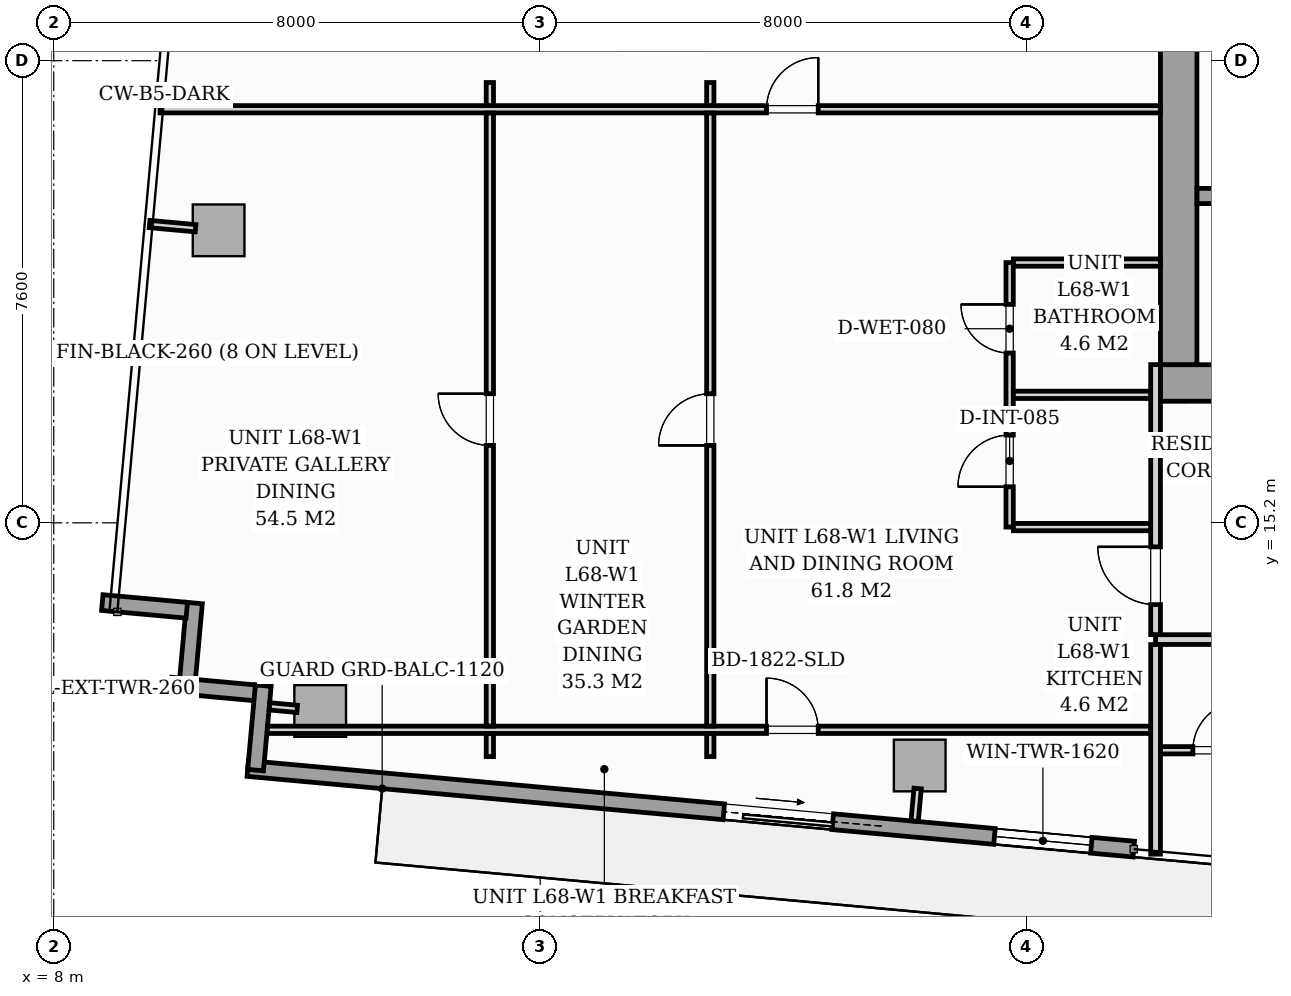
"""IFC4 building model, lengths in metres.
Left out: names, types, materials, properties, quantities, classifications, styles, units other than length and angle.
Written with IfcOpenShell. Run it as: python <this file> out.ifc"""

import sys

from ifc_helpers import new_model, si_unit, direction, frame, frame_2d, origin, origin_2d, place, context, subcontext, project, spatial, rectangle, i_section, extrude, source, transform, mapped, element, fill, save


model = new_model("IFC4")
c1 = context("Model", 3, precision=1e-05, world=origin(), true_north=direction((0.0, 1.0)))
c2 = subcontext(c1, "Body", "Model", "MODEL_VIEW")
j1 = project(units=[si_unit("LENGTHUNIT", "METRE"), si_unit("PLANEANGLEUNIT", "RADIAN")], contexts=[c1])
p1 = place(None, origin())
s1 = spatial("IfcSite", under=j1, at=p1, CompositionType="ELEMENT")
p2 = place(p1, origin())
s2 = spatial("IfcBuilding", under=s1, at=p2, CompositionType="ELEMENT")
p3 = place(p2, frame((0.0, 0.0, 236.4)))
s3 = spatial("IfcBuildingStorey", under=s2, at=p3, CompositionType="ELEMENT", Elevation=236.4)
m1 = source(origin(), c2, "Body", "SweptSolid", [
    extrude(i_section(OverallWidth=0.409, OverallDepth=0.425, WebThickness=0.033, FlangeThickness=0.052, FilletRadius=0.018, at=origin_2d()), origin(), (0.0, 0.0, 1.0), 3.296),
])
p4 = place(p3, frame((26.4, 17.4, 0.002), z_axis=(0.0, 0.0, 1.0), x_axis=(1.0, 0.0, 0.0)))
e1 = element("IfcColumn", 1, at=p4, inside=s3, PredefinedType="PILASTER", context=c2, shape_type="MappedRepresentation", body=[
    mapped(m1, transform((0.0, 0.0, 0.0), scale=1.0)),
])
m2 = source(origin(), c2, "Body", "SweptSolid", [
    extrude(rectangle(XDim=0.85, YDim=0.85, at=origin_2d()), origin(), (0.0, 0.0, 1.0), 3.296),
])
for number, where, z_axis, x_axis in (
    (2, (12.382, 12.106, 0.002), (0.0, 0.0, 1.0), (0.996, -0.091, 0.0)),
    (3, (22.241, 11.209, 0.002), (0.0, 0.0, 1.0), (0.996, -0.091, 0.0)),
    (4, (10.711, 20.01, 0.002), (0.0, 0.0, 1.0), (0.996, -0.091, 0.0)),
):
    element("IfcColumn", number, at=place(p3, frame(where, z_axis=z_axis, x_axis=x_axis)), inside=s3, PredefinedType="COLUMN", context=c2, shape_type="MappedRepresentation", body=[
        mapped(m2, transform((0.0, 0.0, 0.0), scale=1.0)),
    ])
p5 = place(p3, frame((11.319, 12.404, 0.0), z_axis=(0.0, 0.0, 1.0), x_axis=(-0.995881721538, 0.090661991521, 0.0)))
e5 = element("IfcWall", 5, at=p5, inside=s3, PredefinedType="STANDARD", context=c2, shape_type="SweptSolid", body=[
    extrude(rectangle(XDim=1.395, YDim=0.26, at=frame_2d((0.698, 0.0))), origin(), (0.0, 0.0, 1.0), 3.04),
])
p6 = place(p3, frame((10.188, 12.492, 0.0), z_axis=(0.0, 0.0, 1.0), x_axis=(0.090646191665, 0.995883159782, 0.0)))
e6 = element("IfcWall", 6, at=p6, inside=s3, PredefinedType="STANDARD", context=c2, shape_type="SweptSolid", body=[
    extrude(rectangle(XDim=1.395, YDim=0.26, at=frame_2d((0.698, 0.0))), origin(), (0.0, 0.0, 1.0), 3.04),
])
p7 = place(p3, frame((10.188, 13.762, 0.0), z_axis=(0.0, 0.0, 1.0), x_axis=(-0.995881721538, 0.090661991521, 0.0)))
e7 = element("IfcWall", 7, at=p7, inside=s3, PredefinedType="STANDARD", context=c2, shape_type="SweptSolid", body=[
    extrude(rectangle(XDim=1.395, YDim=0.26, at=frame_2d((0.698, 0.0))), origin(), (0.0, 0.0, 1.0), 3.04),
])
p8 = place(p3, frame((25.761, 9.834, 0.0), z_axis=(0.0, 0.0, 1.0), x_axis=(-0.995884584572, 0.090630536861, 0.0)))
e8 = element("IfcWall", 8, at=p8, inside=s3, PredefinedType="STANDARD", context=c2, shape_type="SweptSolid", body=[
    extrude(rectangle(XDim=14.63, YDim=0.26, at=frame_2d((7.315, 0.0))), origin(), (0.0, 0.0, 1.0), 3.04),
])
p9 = place(p8, frame((4.97, 0.0, 0.0)))
e9 = element("IfcOpeningElement", 9, at=p9, cuts=e8, PredefinedType="OPENING", context=c2, shape_type="SweptSolid", body=[
    extrude(rectangle(XDim=1.8, YDim=2.06, at=frame_2d((0.9, 1.03))), frame((0.0, 0.14, 0.0), z_axis=(0.0, -1.0, 0.0), x_axis=(1.0, 0.0, 0.0)), (0.0, 0.0, 1.0), 0.28),
])
p10 = place(p8, frame((0.7, 0.0, 0.65)))
e10 = element("IfcOpeningElement", 10, at=p10, cuts=e8, PredefinedType="OPENING", context=c2, shape_type="SweptSolid", body=[
    extrude(rectangle(XDim=1.6, YDim=1.5, at=frame_2d((0.8, 0.75))), frame((0.0, 0.14, 0.0), z_axis=(0.0, -1.0, 0.0), x_axis=(1.0, 0.0, 0.0)), (0.0, 0.0, 1.0), 0.28),
])
p11 = place(p3, frame((11.319, 11.134, 0.0), z_axis=(0.0, 0.0, 1.0), x_axis=(0.090661991521, 0.995881721538, 0.0)))
e11 = element("IfcWall", 11, at=p11, inside=s3, PredefinedType="STANDARD", context=c2, shape_type="SweptSolid", body=[
    extrude(rectangle(XDim=1.395, YDim=0.26, at=frame_2d((0.698, 0.0))), origin(), (0.0, 0.0, 1.0), 3.04),
])
p12 = place(p3, frame((26.2, 17.5, 0.0), z_axis=(0.0, 0.0, 1.0), x_axis=(1.0, 0.0, 0.0)))
e12 = element("IfcWall", 12, at=p12, inside=s3, PredefinedType="SHEAR", context=c2, shape_type="SweptSolid", body=[
    extrude(rectangle(XDim=19.6, YDim=0.6, at=frame_2d((9.8, 0.0))), origin(), (0.0, 0.0, 1.0), 3.3),
])
p13 = place(p12, frame((0.95, 0.0, 0.0)))
e13 = element("IfcOpeningElement", 13, at=p13, cuts=e12, PredefinedType="OPENING", context=c2, shape_type="SweptSolid", body=[
    extrude(rectangle(XDim=0.95, YDim=2.06, at=frame_2d((0.475, 1.03))), frame((0.0, 0.31, 0.0), z_axis=(0.0, -1.0, 0.0), x_axis=(1.0, 0.0, 0.0)), (0.0, 0.0, 1.0), 0.62),
])
p14 = place(p12, frame((9.38, 0.0, 0.0)))
e14 = element("IfcOpeningElement", 14, at=p14, cuts=e12, PredefinedType="OPENING", context=c2, shape_type="SweptSolid", body=[
    extrude(rectangle(XDim=0.85, YDim=2.0, at=frame_2d((0.425, 1.0))), frame((0.0, 0.31, 0.0), z_axis=(0.0, -1.0, 0.0), x_axis=(1.0, 0.0, 0.0)), (0.0, 0.0, 1.0), 0.62),
])
p15 = place(p12, frame((17.55, 0.0, 0.0)))
e15 = element("IfcOpeningElement", 15, at=p15, cuts=e12, PredefinedType="OPENING", context=c2, shape_type="SweptSolid", body=[
    extrude(rectangle(XDim=0.95, YDim=2.06, at=frame_2d((0.475, 1.03))), frame((0.0, 0.31, 0.0), z_axis=(0.0, -1.0, 0.0), x_axis=(1.0, 0.0, 0.0)), (0.0, 0.0, 1.0), 0.62),
])
p16 = place(p3, frame((26.5, 17.802, 0.0), z_axis=(0.0, 0.0, 1.0), x_axis=(0.0, 1.0, 0.0)))
e16 = element("IfcWall", 16, at=p16, inside=s3, PredefinedType="SHEAR", context=c2, shape_type="SweptSolid", body=[
    extrude(rectangle(XDim=5.796, YDim=0.6, at=frame_2d((2.898, 0.0))), origin(), (0.0, 0.0, 1.0), 3.3),
])
p17 = place(p3, frame((26.802, 20.575, 0.0), z_axis=(0.0, 0.0, 1.0), x_axis=(1.0, 0.0, 0.0)))
e17 = element("IfcWall", 17, at=p17, inside=s3, PredefinedType="SOLIDWALL", context=c2, shape_type="SweptSolid", body=[
    extrude(rectangle(XDim=8.148, YDim=0.25, at=frame_2d((4.074, 0.0))), origin(), (0.0, 0.0, 1.0), 3.3),
])
p18 = place(p17, frame((0.298, 0.0, 0.0)))
e18 = element("IfcOpeningElement", 18, at=p18, cuts=e17, PredefinedType="OPENING", context=c2, shape_type="SweptSolid", body=[
    extrude(rectangle(XDim=0.95, YDim=2.06, at=frame_2d((0.475, 1.03))), frame((0.0, 0.135, 0.0), z_axis=(0.0, -1.0, 0.0), x_axis=(1.0, 0.0, 0.0)), (0.0, 0.0, 1.0), 0.27),
])
p19 = place(p3, frame((26.12, 13.28, 0.0), z_axis=(0.0, 0.0, 1.0), x_axis=(1.0, 0.0, 0.0)))
e19 = element("IfcWall", 19, at=p19, inside=s3, PredefinedType="PARTITIONING", context=c2, shape_type="SweptSolid", body=[
    extrude(rectangle(XDim=21.33, YDim=0.16, at=frame_2d((10.665, 0.0))), origin(), (0.0, 0.0, 1.0), 2.597),
])
p20 = place(p19, frame((4.704, 0.0, 0.0)))
e20 = element("IfcOpeningElement", 20, at=p20, cuts=e19, PredefinedType="OPENING", context=c2, shape_type="SweptSolid", body=[
    extrude(rectangle(XDim=0.95, YDim=2.06, at=frame_2d((0.475, 1.03))), frame((0.0, 0.09, 0.0), z_axis=(0.0, -1.0, 0.0), x_axis=(1.0, 0.0, 0.0)), (0.0, 0.0, 1.0), 0.18),
])
p21 = place(p19, frame((7.5, 0.0, 0.0)))
e21 = element("IfcOpeningElement", 21, at=p21, cuts=e19, PredefinedType="OPENING", context=c2, shape_type="SweptSolid", body=[
    extrude(rectangle(XDim=0.95, YDim=2.06, at=frame_2d((0.475, 1.03))), frame((0.0, 0.09, 0.0), z_axis=(0.0, -1.0, 0.0), x_axis=(1.0, 0.0, 0.0)), (0.0, 0.0, 1.0), 0.18),
])
p22 = place(p19, frame((14.976, 0.0, 0.0)))
e22 = element("IfcOpeningElement", 22, at=p22, cuts=e19, PredefinedType="OPENING", context=c2, shape_type="SweptSolid", body=[
    extrude(rectangle(XDim=0.95, YDim=2.06, at=frame_2d((0.475, 1.03))), frame((0.0, 0.09, 0.0), z_axis=(0.0, -1.0, 0.0), x_axis=(1.0, 0.0, 0.0)), (0.0, 0.0, 1.0), 0.18),
])
p23 = place(p3, frame((26.12, 9.751, 0.0), z_axis=(0.0, 0.0, 1.0), x_axis=(0.0, 1.0, 0.0)))
e23 = element("IfcWall", 23, at=p23, inside=s3, PredefinedType="PARTITIONING", context=c2, shape_type="SweptSolid", body=[
    extrude(rectangle(XDim=3.447, YDim=0.16, at=frame_2d((1.723, 0.0))), origin(), (0.0, 0.0, 1.0), 3.04),
])
p24 = place(p3, frame((26.12, 13.362, 0.0), z_axis=(0.0, 0.0, 1.0), x_axis=(0.0, 1.0, 0.0)))
e24 = element("IfcWall", 24, at=p24, inside=s3, PredefinedType="PARTITIONING", context=c2, shape_type="SweptSolid", body=[
    extrude(rectangle(XDim=4.44, YDim=0.16, at=frame_2d((2.22, 0.0))), origin(), (0.0, 0.0, 1.0), 3.04),
])
p25 = place(p24, frame((0.493, 0.0, 0.0)))
e25 = element("IfcOpeningElement", 25, at=p25, cuts=e24, PredefinedType="OPENING", context=c2, shape_type="SweptSolid", body=[
    extrude(rectangle(XDim=0.95, YDim=2.06, at=frame_2d((0.475, 1.03))), frame((0.0, 0.09, 0.0), z_axis=(0.0, -1.0, 0.0), x_axis=(1.0, 0.0, 0.0)), (0.0, 0.0, 1.0), 0.18),
])
p26 = place(p3, frame((26.202, 11.46, 0.0), z_axis=(0.0, 0.0, 1.0), x_axis=(1.0, 0.0, 0.0)))
e26 = element("IfcWall", 26, at=p26, inside=s3, PredefinedType="PARTITIONING", context=c2, shape_type="SweptSolid", body=[
    extrude(rectangle(XDim=3.978, YDim=0.12, at=frame_2d((1.989, 0.0))), origin(), (0.0, 0.0, 1.0), 2.597),
])
p27 = place(p26, frame((0.531, 0.0, 0.0)))
e27 = element("IfcOpeningElement", 27, at=p27, cuts=e26, PredefinedType="OPENING", context=c2, shape_type="SweptSolid", body=[
    extrude(rectangle(XDim=0.8, YDim=2.02, at=frame_2d((0.4, 1.01))), frame((0.0, 0.07, 0.0), z_axis=(0.0, -1.0, 0.0), x_axis=(1.0, 0.0, 0.0)), (0.0, 0.0, 1.0), 0.14),
])
p28 = place(p26, frame((2.496, 0.0, 0.0)))
e28 = element("IfcOpeningElement", 28, at=p28, cuts=e26, PredefinedType="OPENING", context=c2, shape_type="SweptSolid", body=[
    extrude(rectangle(XDim=0.85, YDim=2.05, at=frame_2d((0.425, 1.025))), frame((0.0, 0.07, 0.0), z_axis=(0.0, -1.0, 0.0), x_axis=(1.0, 0.0, 0.0)), (0.0, 0.0, 1.0), 0.14),
])
p29 = place(p3, frame((23.72, 15.13, 0.0), z_axis=(0.0, 0.0, 1.0), x_axis=(0.0, 1.0, 0.0)))
e29 = element("IfcWall", 29, at=p29, inside=s3, PredefinedType="PARTITIONING", context=c2, shape_type="SweptSolid", body=[
    extrude(rectangle(XDim=4.35, YDim=0.12, at=frame_2d((2.175, 0.0))), origin(), (0.0, 0.0, 1.0), 3.04),
])
p30 = place(p29, frame((0.663, 0.0, 0.0)))
e30 = element("IfcOpeningElement", 30, at=p30, cuts=e29, PredefinedType="OPENING", context=c2, shape_type="SweptSolid", body=[
    extrude(rectangle(XDim=0.85, YDim=2.05, at=frame_2d((0.425, 1.025))), frame((0.0, 0.07, 0.0), z_axis=(0.0, -1.0, 0.0), x_axis=(1.0, 0.0, 0.0)), (0.0, 0.0, 1.0), 0.14),
])
p31 = place(p29, frame((2.862, 0.0, 0.0)))
e31 = element("IfcOpeningElement", 31, at=p31, cuts=e29, PredefinedType="OPENING", context=c2, shape_type="SweptSolid", body=[
    extrude(rectangle(XDim=0.8, YDim=2.02, at=frame_2d((0.4, 1.01))), frame((0.0, 0.07, 0.0), z_axis=(0.0, -1.0, 0.0), x_axis=(1.0, 0.0, 0.0)), (0.0, 0.0, 1.0), 0.14),
])
p32 = place(p3, frame((23.782, 17.305, 0.0), z_axis=(0.0, 0.0, 1.0), x_axis=(1.0, 0.0, 0.0)))
e32 = element("IfcWall", 32, at=p32, inside=s3, PredefinedType="PARTITIONING", context=c2, shape_type="SweptSolid", body=[
    extrude(rectangle(XDim=2.256, YDim=0.12, at=frame_2d((1.128, 0.0))), origin(), (0.0, 0.0, 1.0), 2.382),
])
p33 = place(p3, frame((23.782, 15.13, 0.0), z_axis=(0.0, 0.0, 1.0), x_axis=(1.0, 0.0, 0.0)))
e33 = element("IfcWall", 33, at=p33, inside=s3, PredefinedType="PARTITIONING", context=c2, shape_type="SweptSolid", body=[
    extrude(rectangle(XDim=2.256, YDim=0.12, at=frame_2d((1.128, 0.0))), origin(), (0.0, 0.0, 1.0), 3.04),
])
p34 = place(p3, frame((23.782, 19.48, 0.0), z_axis=(0.0, 0.0, 1.0), x_axis=(1.0, 0.0, 0.0)))
e34 = element("IfcWall", 34, at=p34, inside=s3, PredefinedType="PARTITIONING", context=c2, shape_type="SweptSolid", body=[
    extrude(rectangle(XDim=2.416, YDim=0.12, at=frame_2d((1.208, 0.0))), origin(), (0.0, 0.0, 1.0), 3.04),
])
p35 = place(p3, frame((9.748, 22.001, 0.0), z_axis=(0.0, 0.0, 1.0), x_axis=(1.0, 0.0, 0.0)))
e35 = element("IfcWall", 35, at=p35, inside=s3, PredefinedType="PARTITIONING", context=c2, shape_type="SweptSolid", body=[
    extrude(rectangle(XDim=16.45, YDim=0.12, at=frame_2d((8.225, 0.0))), origin(), (0.0, 0.0, 1.0), 3.04),
])
p36 = place(p35, frame((9.974, 0.0, 0.0)))
e36 = element("IfcOpeningElement", 36, at=p36, cuts=e35, PredefinedType="OPENING", context=c2, shape_type="SweptSolid", body=[
    extrude(rectangle(XDim=0.85, YDim=2.05, at=frame_2d((0.425, 1.025))), frame((0.0, 0.07, 0.0), z_axis=(0.0, -1.0, 0.0), x_axis=(1.0, 0.0, 0.0)), (0.0, 0.0, 1.0), 0.14),
])
p37 = place(p3, frame((11.512, 11.796, 0.0), z_axis=(0.0, 0.0, 1.0), x_axis=(1.0, 0.0, 0.0)))
e37 = element("IfcWall", 37, at=p37, inside=s3, PredefinedType="PARTITIONING", context=c2, shape_type="SweptSolid", body=[
    extrude(rectangle(XDim=14.526, YDim=0.12, at=frame_2d((7.263, 0.0))), origin(), (0.0, 0.0, 1.0), 2.483),
])
p38 = place(p37, frame((8.21, 0.0, 0.0)))
e38 = element("IfcOpeningElement", 38, at=p38, cuts=e37, PredefinedType="OPENING", context=c2, shape_type="SweptSolid", body=[
    extrude(rectangle(XDim=0.85, YDim=2.05, at=frame_2d((0.425, 1.025))), frame((0.0, 0.07, 0.0), z_axis=(0.0, -1.0, 0.0), x_axis=(1.0, 0.0, 0.0)), (0.0, 0.0, 1.0), 0.14),
])
p39 = place(p3, frame((15.172, 11.356, 0.0), z_axis=(0.0, 0.0, 1.0), x_axis=(0.0, 1.0, 0.0)))
e39 = element("IfcWall", 39, at=p39, inside=s3, PredefinedType="PARTITIONING", context=c2, shape_type="SweptSolid", body=[
    extrude(rectangle(XDim=0.378, YDim=0.12, at=frame_2d((0.189, 0.0))), origin(), (0.0, 0.0, 1.0), 3.04),
])
p40 = place(p3, frame((15.172, 11.858, 0.0), z_axis=(0.0, 0.0, 1.0), x_axis=(0.0, 1.0, 0.0)))
e40 = element("IfcWall", 40, at=p40, inside=s3, PredefinedType="PARTITIONING", context=c2, shape_type="SweptSolid", body=[
    extrude(rectangle(XDim=10.081, YDim=0.12, at=frame_2d((5.041, 0.0))), origin(), (0.0, 0.0, 1.0), 3.04),
])
p41 = place(p40, frame((4.615, 0.0, 0.0)))
e41 = element("IfcOpeningElement", 41, at=p41, cuts=e40, PredefinedType="OPENING", context=c2, shape_type="SweptSolid", body=[
    extrude(rectangle(XDim=0.85, YDim=2.05, at=frame_2d((0.425, 1.025))), frame((0.0, 0.07, 0.0), z_axis=(0.0, -1.0, 0.0), x_axis=(1.0, 0.0, 0.0)), (0.0, 0.0, 1.0), 0.14),
])
for number, where, z_axis, x_axis in (
    (42, (15.172, 22.063, 0.0), (0.0, 0.0, 1.0), (0.0, 1.0, 0.0)),
    (43, (18.797, 11.356, 0.0), (0.0, 0.0, 1.0), (0.0, 1.0, 0.0)),
):
    element("IfcWall", number, at=place(p3, frame(where, z_axis=z_axis, x_axis=x_axis)), inside=s3, PredefinedType="PARTITIONING", context=c2, shape_type="SweptSolid", body=[
        extrude(rectangle(XDim=0.378, YDim=0.12, at=frame_2d((0.189, 0.0))), origin(), (0.0, 0.0, 1.0), 3.04),
    ])
p42 = place(p3, frame((18.797, 11.858, 0.0), z_axis=(0.0, 0.0, 1.0), x_axis=(0.0, 1.0, 0.0)))
e44 = element("IfcWall", 44, at=p42, inside=s3, PredefinedType="PARTITIONING", context=c2, shape_type="SweptSolid", body=[
    extrude(rectangle(XDim=10.081, YDim=0.12, at=frame_2d((5.041, 0.0))), origin(), (0.0, 0.0, 1.0), 3.04),
])
p43 = place(p42, frame((4.615, 0.0, 0.0)))
e45 = element("IfcOpeningElement", 45, at=p43, cuts=e44, PredefinedType="OPENING", context=c2, shape_type="SweptSolid", body=[
    extrude(rectangle(XDim=0.85, YDim=2.05, at=frame_2d((0.425, 1.025))), frame((0.0, 0.07, 0.0), z_axis=(0.0, -1.0, 0.0), x_axis=(1.0, 0.0, 0.0)), (0.0, 0.0, 1.0), 0.14),
])
p44 = place(p3, frame((18.797, 22.063, 0.0), z_axis=(0.0, 0.0, 1.0), x_axis=(0.0, 1.0, 0.0)))
e46 = element("IfcWall", 46, at=p44, inside=s3, PredefinedType="PARTITIONING", context=c2, shape_type="SweptSolid", body=[
    extrude(rectangle(XDim=0.378, YDim=0.12, at=frame_2d((0.189, 0.0))), origin(), (0.0, 0.0, 1.0), 3.04),
])
p45 = place(p3, frame((12.003, 12.141, 0.0), z_axis=(0.0, 0.0, 1.0), x_axis=(-0.995884462012, 0.090631883588, 0.0)))
e47 = element("IfcWall", 47, at=p45, inside=s3, PredefinedType="PARTITIONING", context=c2, shape_type="SweptSolid", body=[
    extrude(rectangle(XDim=0.458, YDim=0.12, at=frame_2d((0.229, 0.0))), origin(), (0.0, 0.0, 1.0), 3.04),
])
p46 = place(p3, frame((22.207, 10.831, 0.0), z_axis=(0.0, 0.0, 1.0), x_axis=(-0.090781299264, -0.995870852924, 0.0)))
e48 = element("IfcWall", 48, at=p46, inside=s3, PredefinedType="PARTITIONING", context=c2, shape_type="SweptSolid", body=[
    extrude(rectangle(XDim=0.538, YDim=0.12, at=frame_2d((0.269, 0.0))), origin(), (0.0, 0.0, 1.0), 3.04),
])
p47 = place(p3, frame((10.333, 20.045, 0.0), z_axis=(0.0, 0.0, 1.0), x_axis=(-0.995890573658, 0.09056470228, 0.0)))
e49 = element("IfcWall", 49, at=p47, inside=s3, PredefinedType="PARTITIONING", context=c2, shape_type="SweptSolid", body=[
    extrude(rectangle(XDim=0.76, YDim=0.12, at=frame_2d((0.38, 0.0))), origin(), (0.0, 0.0, 1.0), 3.04),
])
m3 = source(origin(), c2, "Body", "SweptSolid", [
    extrude(rectangle(XDim=1.8, YDim=2.06, at=frame_2d((0.9, 1.03))), frame((0.0, 0.025, 0.0), z_axis=(0.0, -1.0, 0.0), x_axis=(1.0, 0.0, 0.0)), (0.0, 0.0, 1.0), 0.05),
])
p48 = place(p9, origin())
e50 = element("IfcDoor", 50, at=p48, inside=s3, OperationType="SLIDING_TO_LEFT", PredefinedType="DOOR", context=c2, shape_type="MappedRepresentation", body=[
    mapped(m3, transform((0.0, 0.0, 0.0), scale=1.0)),
])
fill(e9, e50)
m4 = source(origin(), c2, "Body", "SweptSolid", [
    extrude(rectangle(XDim=1.6, YDim=1.5, at=frame_2d((0.8, 0.75))), frame((0.0, 0.03, 0.0), z_axis=(0.0, -1.0, 0.0), x_axis=(1.0, 0.0, 0.0)), (0.0, 0.0, 1.0), 0.06),
])
p49 = place(p10, origin())
e51 = element("IfcWindow", 51, at=p49, inside=s3, PartitioningType="SINGLE_PANEL", PredefinedType="WINDOW", context=c2, shape_type="MappedRepresentation", body=[
    mapped(m4, transform((0.0, 0.0, 0.0), scale=1.0)),
])
fill(e10, e51)
m5 = source(origin(), c2, "Body", "SweptSolid", [
    extrude(rectangle(XDim=0.8, YDim=2.02, at=frame_2d((0.4, 1.01))), frame((0.0, 0.025, 0.0), z_axis=(0.0, -1.0, 0.0), x_axis=(1.0, 0.0, 0.0)), (0.0, 0.0, 1.0), 0.05),
])
p50 = place(p27, origin())
e52 = element("IfcDoor", 52, at=p50, inside=s3, OperationType="SINGLE_SWING_RIGHT", PredefinedType="DOOR", context=c2, shape_type="MappedRepresentation", body=[
    mapped(m5, transform((0.0, 0.0, 0.0), scale=1.0)),
])
fill(e27, e52)
m6 = source(origin(), c2, "Body", "SweptSolid", [
    extrude(rectangle(XDim=0.95, YDim=2.06, at=frame_2d((0.475, 1.03))), frame((0.0, 0.025, 0.0), z_axis=(0.0, -1.0, 0.0), x_axis=(1.0, 0.0, 0.0)), (0.0, 0.0, 1.0), 0.05),
])
p51 = place(p25, origin())
e53 = element("IfcDoor", 53, at=p51, inside=s3, OperationType="SINGLE_SWING_RIGHT", PredefinedType="DOOR", context=c2, shape_type="MappedRepresentation", body=[
    mapped(m6, transform((0.0, 0.0, 0.0), scale=1.0)),
])
fill(e25, e53)
m7 = source(origin(), c2, "Body", "SweptSolid", [
    extrude(rectangle(XDim=0.85, YDim=2.05, at=frame_2d((0.425, 1.025))), frame((0.0, 0.025, 0.0), z_axis=(0.0, -1.0, 0.0), x_axis=(1.0, 0.0, 0.0)), (0.0, 0.0, 1.0), 0.05),
])
p52 = place(p30, origin())
e54 = element("IfcDoor", 54, at=p52, inside=s3, OperationType="SINGLE_SWING_LEFT", PredefinedType="DOOR", context=c2, shape_type="MappedRepresentation", body=[
    mapped(m7, transform((0.0, 0.0, 0.0), scale=1.0)),
])
fill(e30, e54)
p53 = place(p31, origin())
e55 = element("IfcDoor", 55, at=p53, inside=s3, OperationType="SINGLE_SWING_RIGHT", PredefinedType="DOOR", context=c2, shape_type="MappedRepresentation", body=[
    mapped(m5, transform((0.0, 0.0, 0.0), scale=1.0)),
])
fill(e31, e55)
p54 = place(p36, origin())
e56 = element("IfcDoor", 56, at=p54, inside=s3, OperationType="SINGLE_SWING_RIGHT", PredefinedType="DOOR", context=c2, shape_type="MappedRepresentation", body=[
    mapped(m7, transform((0.0, 0.0, 0.0), scale=1.0)),
])
fill(e36, e56)
p55 = place(p38, origin())
e57 = element("IfcDoor", 57, at=p55, inside=s3, OperationType="SINGLE_SWING_LEFT", PredefinedType="DOOR", context=c2, shape_type="MappedRepresentation", body=[
    mapped(m7, transform((0.0, 0.0, 0.0), scale=1.0)),
])
fill(e38, e57)
p56 = place(p41, origin())
e58 = element("IfcDoor", 58, at=p56, inside=s3, OperationType="SINGLE_SWING_RIGHT", PredefinedType="DOOR", context=c2, shape_type="MappedRepresentation", body=[
    mapped(m7, transform((0.0, 0.0, 0.0), scale=1.0)),
])
fill(e41, e58)
p57 = place(p43, origin())
e59 = element("IfcDoor", 59, at=p57, inside=s3, OperationType="SINGLE_SWING_LEFT", PredefinedType="DOOR", context=c2, shape_type="MappedRepresentation", body=[
    mapped(m7, transform((0.0, 0.0, 0.0), scale=1.0)),
])
fill(e45, e59)
save(model, sys.argv[1])
